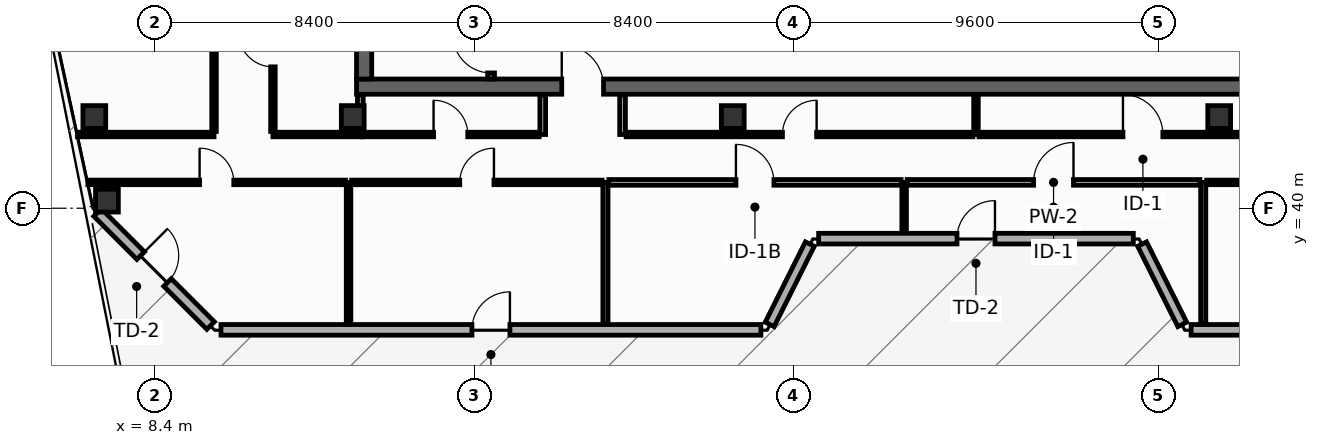
"""IFC4 building model, lengths in metres.
Left out: names, types, materials, properties, quantities, classifications, styles, units other than length and angle.
Written with IfcOpenShell. Run it as: python <this file> out.ifc"""

import sys

from ifc_helpers import new_model, si_unit, direction, frame, frame_2d, origin, origin_2d, place, context, subcontext, project, spatial, rectangle, hollow_rectangle, extrude, element, fill, save


model = new_model("IFC4")
c1 = context("Model", 3, precision=1e-05, world=origin(), true_north=direction((0.0, 1.0)))
c2 = subcontext(c1, "Body", "Model", "MODEL_VIEW")
j1 = project(units=[si_unit("LENGTHUNIT", "METRE"), si_unit("PLANEANGLEUNIT", "RADIAN")], contexts=[c1])
p1 = place(None, origin())
s1 = spatial("IfcSite", under=j1, at=p1, CompositionType="ELEMENT")
p2 = place(p1, origin())
s2 = spatial("IfcBuilding", under=s1, at=p2, CompositionType="ELEMENT")
p3 = place(p2, frame((0.0, 0.0, 310.4)))
s3 = spatial("IfcBuildingStorey", under=s2, at=p3, CompositionType="ELEMENT", Elevation=310.4)
p4 = place(p3, frame((13.7, 43.2, 0.0), z_axis=(0.0, 0.0, 1.0), x_axis=(1.0, 0.0, 0.0)))
e1 = element("IfcWall", 1, at=p4, inside=s3, PredefinedType="SHEAR", context=c2, shape_type="SweptSolid", body=[
    extrude(rectangle(XDim=32.5, YDim=0.4, at=frame_2d((16.25, 0.0))), origin(), (0.0, 0.0, 1.0), 3.55),
])
p5 = place(p4, frame((5.4, 0.0, 0.0)))
e2 = element("IfcOpeningElement", 2, at=p5, cuts=e1, PredefinedType="OPENING", context=c2, shape_type="SweptSolid", body=[
    extrude(rectangle(XDim=1.1, YDim=2.15, at=frame_2d((0.55, 1.075))), frame((0.0, 0.21, 0.0), z_axis=(0.0, -1.0, 0.0), x_axis=(1.0, 0.0, 0.0)), (0.0, 0.0, 1.0), 0.42),
])
p6 = place(p4, frame((25.6, 0.0, 0.0)))
e3 = element("IfcOpeningElement", 3, at=p6, cuts=e1, PredefinedType="OPENING", context=c2, shape_type="SweptSolid", body=[
    extrude(rectangle(XDim=1.1, YDim=2.15, at=frame_2d((0.55, 1.075))), frame((0.0, 0.21, 0.0), z_axis=(0.0, -1.0, 0.0), x_axis=(1.0, 0.0, 0.0)), (0.0, 0.0, 1.0), 0.42),
])
p7 = place(p3, frame((13.9, 43.4, 0.0), z_axis=(0.0, 0.0, 1.0), x_axis=(0.0, 1.0, 0.0)))
e4 = element("IfcWall", 4, at=p7, inside=s3, PredefinedType="SHEAR", context=c2, shape_type="SweptSolid", body=[
    extrude(rectangle(XDim=10.4, YDim=0.4, at=frame_2d((5.2, 0.0))), origin(), (0.0, 0.0, 1.0), 3.55),
])
for number, where, z_axis, x_axis in (
    (5, (6.8, 42.4, 0.0), (0.0, 0.0, 1.0), (1.0, 0.0, 0.0)),
    (6, (13.6, 42.4, 0.0), (0.0, 0.0, 1.0), (1.0, 0.0, 0.0)),
    (7, (23.6, 42.4, 0.0), (0.0, 0.0, 1.0), (1.0, 0.0, 0.0)),
    (8, (36.4, 42.4, 0.0), (0.0, 0.0, 1.0), (1.0, 0.0, 0.0)),
    (9, (7.132, 40.2, 0.0), (0.0, 0.0, 1.0), (1.0, 0.0, 0.0)),
):
    element("IfcColumn", number, at=place(p3, frame(where, z_axis=z_axis, x_axis=x_axis)), inside=s3, PredefinedType="COLUMN", context=c2, shape_type="SweptSolid", body=[
        extrude(hollow_rectangle(XDim=0.6, YDim=0.6, WallThickness=0.028, at=origin_2d()), origin(), (0.0, 0.0, 1.0), 3.8),
    ])
p8 = place(p3, frame((17.24, 43.4, 0.0), z_axis=(0.0, 0.0, 1.0), x_axis=(0.0, 1.0, 0.0)))
e10 = element("IfcWall", 10, at=p8, inside=s3, PredefinedType="SHEAR", context=c2, shape_type="SweptSolid", body=[
    extrude(rectangle(XDim=10.4, YDim=0.18, at=frame_2d((5.2, 0.0))), origin(), (0.0, 0.0, 1.0), 3.55),
])
p9 = place(p8, frame((0.16, 0.0, 0.0)))
e11 = element("IfcOpeningElement", 11, at=p9, cuts=e10, PredefinedType="OPENING", context=c2, shape_type="SweptSolid", body=[
    extrude(rectangle(XDim=1.0, YDim=2.15, at=frame_2d((0.5, 1.075))), frame((0.0, 0.1, 0.0), z_axis=(0.0, -1.0, 0.0), x_axis=(1.0, 0.0, 0.0)), (0.0, 0.0, 1.0), 0.2),
])
p10 = place(p3, frame((6.886, 39.887, 0.0), z_axis=(0.0, 0.0, 1.0), x_axis=(0.70707775441, -0.707135806771, 0.0)))
e12 = element("IfcWall", 12, at=p10, inside=s3, PredefinedType="STANDARD", context=c2, shape_type="SweptSolid", body=[
    extrude(rectangle(XDim=4.206, YDim=0.28, at=frame_2d((2.103, 0.0))), origin(), (0.0, 0.0, 1.0), 3.55),
])
p11 = place(p10, frame((1.603, 0.0, 0.0)))
e13 = element("IfcOpeningElement", 13, at=p11, cuts=e12, PredefinedType="OPENING", context=c2, shape_type="SweptSolid", body=[
    extrude(rectangle(XDim=1.0, YDim=2.2, at=frame_2d((0.5, 1.1))), frame((0.0, 0.15, 0.0), z_axis=(0.0, -1.0, 0.0), x_axis=(1.0, 0.0, 0.0)), (0.0, 0.0, 1.0), 0.3),
])
p12 = place(p3, frame((10.133, 36.8, 0.0), z_axis=(0.0, 0.0, 1.0), x_axis=(1.0, 0.0, 0.0)))
e14 = element("IfcWall", 14, at=p12, inside=s3, PredefinedType="STANDARD", context=c2, shape_type="SweptSolid", body=[
    extrude(rectangle(XDim=14.207, YDim=0.28, at=frame_2d((7.104, 0.0))), origin(), (0.0, 0.0, 1.0), 3.55),
])
p13 = place(p12, frame((6.603, 0.0, 0.0)))
e15 = element("IfcOpeningElement", 15, at=p13, cuts=e14, PredefinedType="OPENING", context=c2, shape_type="SweptSolid", body=[
    extrude(rectangle(XDim=1.0, YDim=2.2, at=frame_2d((0.5, 1.1))), frame((0.0, 0.15, 0.0), z_axis=(0.0, -1.0, 0.0), x_axis=(1.0, 0.0, 0.0)), (0.0, 0.0, 1.0), 0.3),
])
p14 = place(p3, frame((24.572, 36.943, 0.0), z_axis=(0.0, 0.0, 1.0), x_axis=(0.4472135955, 0.894427191, 0.0)))
e16 = element("IfcWall", 16, at=p14, inside=s3, PredefinedType="STANDARD", context=c2, shape_type="SweptSolid", body=[
    extrude(rectangle(XDim=2.363, YDim=0.26, at=frame_2d((1.182, 0.0))), origin(), (0.0, 0.0, 1.0), 3.55),
])
p15 = place(p3, frame((25.86, 39.2, 0.0), z_axis=(0.0, 0.0, 1.0), x_axis=(1.0, 0.0, 0.0)))
e17 = element("IfcWall", 17, at=p15, inside=s3, PredefinedType="STANDARD", context=c2, shape_type="SweptSolid", body=[
    extrude(rectangle(XDim=8.28, YDim=0.28, at=frame_2d((4.14, 0.0))), origin(), (0.0, 0.0, 1.0), 3.55),
])
p16 = place(p15, frame((3.64, 0.0, 0.0)))
e18 = element("IfcOpeningElement", 18, at=p16, cuts=e17, PredefinedType="OPENING", context=c2, shape_type="SweptSolid", body=[
    extrude(rectangle(XDim=1.0, YDim=2.2, at=frame_2d((0.5, 1.1))), frame((0.0, 0.15, 0.0), z_axis=(0.0, -1.0, 0.0), x_axis=(1.0, 0.0, 0.0)), (0.0, 0.0, 1.0), 0.3),
])
p17 = place(p3, frame((34.372, 39.057, 0.0), z_axis=(0.0, 0.0, 1.0), x_axis=(0.4472135955, -0.894427191, 0.0)))
e19 = element("IfcWall", 19, at=p17, inside=s3, PredefinedType="STANDARD", context=c2, shape_type="SweptSolid", body=[
    extrude(rectangle(XDim=2.363, YDim=0.26, at=frame_2d((1.182, 0.0))), origin(), (0.0, 0.0, 1.0), 3.55),
])
p18 = place(p3, frame((35.66, 36.8, 0.0), z_axis=(0.0, 0.0, 1.0), x_axis=(1.0, 0.0, 0.0)))
e20 = element("IfcWall", 20, at=p18, inside=s3, PredefinedType="STANDARD", context=c2, shape_type="SweptSolid", body=[
    extrude(rectangle(XDim=14.207, YDim=0.28, at=frame_2d((7.104, 0.0))), origin(), (0.0, 0.0, 1.0), 3.55),
])
p19 = place(p18, frame((6.603, 0.0, 0.0)))
e21 = element("IfcOpeningElement", 21, at=p19, cuts=e20, PredefinedType="OPENING", context=c2, shape_type="SweptSolid", body=[
    extrude(rectangle(XDim=1.0, YDim=2.2, at=frame_2d((0.5, 1.1))), frame((0.0, 0.15, 0.0), z_axis=(0.0, -1.0, 0.0), x_axis=(1.0, 0.0, 0.0)), (0.0, 0.0, 1.0), 0.3),
])
p20 = place(p3, frame((6.358, 41.94, 0.0), z_axis=(0.0, 0.0, 1.0), x_axis=(1.0, 0.0, 0.0)))
e22 = element("IfcWall", 22, at=p20, inside=s3, PredefinedType="PARTITIONING", context=c2, shape_type="SweptSolid", body=[
    extrude(rectangle(XDim=3.592, YDim=0.12, at=frame_2d((1.796, 0.0))), origin(), (0.0, 0.0, 1.0), 3.085),
])
p21 = place(p3, frame((11.5, 41.94, 0.0), z_axis=(0.0, 0.0, 1.0), x_axis=(1.0, 0.0, 0.0)))
e23 = element("IfcWall", 23, at=p21, inside=s3, PredefinedType="PARTITIONING", context=c2, shape_type="SweptSolid", body=[
    extrude(rectangle(XDim=2.35, YDim=0.12, at=frame_2d((1.175, 0.0))), origin(), (0.0, 0.0, 1.0), 3.55),
])
p22 = place(p3, frame((9.95, 42.02, 0.0), z_axis=(0.0, 0.0, 1.0), x_axis=(0.0, 1.0, 0.0)))
e24 = element("IfcWall", 24, at=p22, inside=s3, PredefinedType="PARTITIONING", context=c2, shape_type="SweptSolid", body=[
    extrude(rectangle(XDim=6.3, YDim=0.12, at=frame_2d((3.15, 0.0))), origin(), (0.0, 0.0, 1.0), 2.947),
])
p23 = place(p22, frame((2.7, 0.0, 0.0)))
e25 = element("IfcOpeningElement", 25, at=p23, cuts=e24, PredefinedType="OPENING", context=c2, shape_type="SweptSolid", body=[
    extrude(rectangle(XDim=0.9, YDim=2.1, at=frame_2d((0.45, 1.05))), frame((0.0, 0.07, 0.0), z_axis=(0.0, -1.0, 0.0), x_axis=(1.0, 0.0, 0.0)), (0.0, 0.0, 1.0), 0.14),
])
p24 = place(p3, frame((11.5, 42.02, 0.0), z_axis=(0.0, 0.0, 1.0), x_axis=(0.0, 1.0, 0.0)))
e26 = element("IfcWall", 26, at=p24, inside=s3, PredefinedType="PARTITIONING", context=c2, shape_type="SweptSolid", body=[
    extrude(rectangle(XDim=4.3, YDim=0.12, at=frame_2d((2.15, 0.0))), origin(), (0.0, 0.0, 1.0), 2.947),
])
p25 = place(p24, frame((1.7, 0.0, 0.0)))
e27 = element("IfcOpeningElement", 27, at=p25, cuts=e26, PredefinedType="OPENING", context=c2, shape_type="SweptSolid", body=[
    extrude(rectangle(XDim=0.9, YDim=2.1, at=frame_2d((0.45, 1.05))), frame((0.0, 0.07, 0.0), z_axis=(0.0, -1.0, 0.0), x_axis=(1.0, 0.0, 0.0)), (0.0, 0.0, 1.0), 0.14),
])
p26 = place(p3, frame((13.8, 42.02, 0.0), z_axis=(0.0, 0.0, 1.0), x_axis=(0.0, 1.0, 0.0)))
e28 = element("IfcWall", 28, at=p26, inside=s3, PredefinedType="PARTITIONING", context=c2, shape_type="SweptSolid", body=[
    extrude(rectangle(XDim=0.96, YDim=0.15, at=frame_2d((0.48, 0.0))), origin(), (0.0, 0.0, 1.0), 3.55),
])
for number, where, z_axis, x_axis in (
    (29, (18.6, 41.94, 0.0), (0.0, 0.0, 1.0), (0.0, 1.0, 0.0)),
    (30, (20.7, 41.94, 0.0), (0.0, 0.0, 1.0), (0.0, 1.0, 0.0)),
):
    element("IfcWall", number, at=place(p3, frame(where, z_axis=z_axis, x_axis=x_axis)), inside=s3, PredefinedType="PARTITIONING", context=c2, shape_type="SweptSolid", body=[
        extrude(rectangle(XDim=1.04, YDim=0.15, at=frame_2d((0.52, 0.0))), origin(), (0.0, 0.0, 1.0), 3.55),
    ])
p27 = place(p3, frame((13.85, 41.94, 0.0), z_axis=(0.0, 0.0, 1.0), x_axis=(1.0, 0.0, 0.0)))
e31 = element("IfcWall", 31, at=p27, inside=s3, PredefinedType="PARTITIONING", context=c2, shape_type="SweptSolid", body=[
    extrude(rectangle(XDim=4.655, YDim=0.12, at=frame_2d((2.327, 0.0))), origin(), (0.0, 0.0, 1.0), 3.55),
])
p28 = place(p27, frame((1.877, 0.0, 0.0)))
e32 = element("IfcOpeningElement", 32, at=p28, cuts=e31, PredefinedType="OPENING", context=c2, shape_type="SweptSolid", body=[
    extrude(rectangle(XDim=0.9, YDim=2.1, at=frame_2d((0.45, 1.05))), frame((0.0, 0.07, 0.0), z_axis=(0.0, -1.0, 0.0), x_axis=(1.0, 0.0, 0.0)), (0.0, 0.0, 1.0), 0.14),
])
p29 = place(p3, frame((30.0, 41.94, 0.0), z_axis=(0.0, 0.0, 1.0), x_axis=(0.0, 1.0, 0.0)))
e33 = element("IfcWall", 33, at=p29, inside=s3, PredefinedType="PARTITIONING", context=c2, shape_type="SweptSolid", body=[
    extrude(rectangle(XDim=1.04, YDim=0.12, at=frame_2d((0.52, 0.0))), origin(), (0.0, 0.0, 1.0), 2.947),
])
p30 = place(p3, frame((20.795, 41.94, 0.0), z_axis=(0.0, 0.0, 1.0), x_axis=(1.0, 0.0, 0.0)))
e34 = element("IfcWall", 34, at=p30, inside=s3, PredefinedType="PARTITIONING", context=c2, shape_type="SweptSolid", body=[
    extrude(rectangle(XDim=9.125, YDim=0.12, at=frame_2d((4.562, 0.0))), origin(), (0.0, 0.0, 1.0), 3.55),
])
p31 = place(p30, frame((4.112, 0.0, 0.0)))
e35 = element("IfcOpeningElement", 35, at=p31, cuts=e34, PredefinedType="OPENING", context=c2, shape_type="SweptSolid", body=[
    extrude(rectangle(XDim=0.9, YDim=2.1, at=frame_2d((0.45, 1.05))), frame((0.0, 0.07, 0.0), z_axis=(0.0, -1.0, 0.0), x_axis=(1.0, 0.0, 0.0)), (0.0, 0.0, 1.0), 0.14),
])
p32 = place(p3, frame((30.08, 41.94, 0.0), z_axis=(0.0, 0.0, 1.0), x_axis=(1.0, 0.0, 0.0)))
e36 = element("IfcWall", 36, at=p32, inside=s3, PredefinedType="PARTITIONING", context=c2, shape_type="SweptSolid", body=[
    extrude(rectangle(XDim=8.625, YDim=0.12, at=frame_2d((4.312, 0.0))), origin(), (0.0, 0.0, 1.0), 3.55),
])
p33 = place(p32, frame((3.788, 0.0, 0.0)))
e37 = element("IfcOpeningElement", 37, at=p33, cuts=e36, PredefinedType="OPENING", context=c2, shape_type="SweptSolid", body=[
    extrude(rectangle(XDim=1.05, YDim=2.15, at=frame_2d((0.525, 1.075))), frame((0.0, 0.07, 0.0), z_axis=(0.0, -1.0, 0.0), x_axis=(1.0, 0.0, 0.0)), (0.0, 0.0, 1.0), 0.14),
])
p34 = place(p3, frame((13.49, 36.96, 0.0), z_axis=(0.0, 0.0, 1.0), x_axis=(0.0, 1.0, 0.0)))
e38 = element("IfcWall", 38, at=p34, inside=s3, PredefinedType="PARTITIONING", context=c2, shape_type="SweptSolid", body=[
    extrude(rectangle(XDim=3.72, YDim=0.12, at=frame_2d((1.86, 0.0))), origin(), (0.0, 0.0, 1.0), 3.55),
])
p35 = place(p3, frame((20.25, 36.96, 0.0), z_axis=(0.0, 0.0, 1.0), x_axis=(0.0, 1.0, 0.0)))
e39 = element("IfcWall", 39, at=p35, inside=s3, PredefinedType="PARTITIONING", context=c2, shape_type="SweptSolid", body=[
    extrude(rectangle(XDim=3.72, YDim=0.135, at=frame_2d((1.86, 0.0))), origin(), (0.0, 0.0, 1.0), 3.55),
])
p36 = place(p3, frame((28.11, 39.36, 0.0), z_axis=(0.0, 0.0, 1.0), x_axis=(0.0, 1.0, 0.0)))
e40 = element("IfcWall", 40, at=p36, inside=s3, PredefinedType="PARTITIONING", context=c2, shape_type="SweptSolid", body=[
    extrude(rectangle(XDim=1.32, YDim=0.12, at=frame_2d((0.66, 0.0))), origin(), (0.0, 0.0, 1.0), 3.55),
])
p37 = place(p3, frame((35.98, 36.96, 0.0), z_axis=(0.0, 0.0, 1.0), x_axis=(0.0, 1.0, 0.0)))
e41 = element("IfcWall", 41, at=p37, inside=s3, PredefinedType="PARTITIONING", context=c2, shape_type="SweptSolid", body=[
    extrude(rectangle(XDim=3.72, YDim=0.135, at=frame_2d((1.86, 0.0))), origin(), (0.0, 0.0, 1.0), 3.55),
])
p38 = place(p3, frame((6.631, 40.68, 0.0), z_axis=(0.0, 0.0, 1.0), x_axis=(1.0, 0.0, 0.0)))
e42 = element("IfcWall", 42, at=p38, inside=s3, PredefinedType="PARTITIONING", context=c2, shape_type="SweptSolid", body=[
    extrude(rectangle(XDim=6.779, YDim=0.12, at=frame_2d((3.389, 0.0))), origin(), (0.0, 0.0, 1.0), 3.085),
])
p39 = place(p38, frame((2.939, 0.0, 0.0)))
e43 = element("IfcOpeningElement", 43, at=p39, cuts=e42, PredefinedType="OPENING", context=c2, shape_type="SweptSolid", body=[
    extrude(rectangle(XDim=0.9, YDim=2.1, at=frame_2d((0.45, 1.05))), frame((0.0, 0.07, 0.0), z_axis=(0.0, -1.0, 0.0), x_axis=(1.0, 0.0, 0.0)), (0.0, 0.0, 1.0), 0.14),
])
p40 = place(p3, frame((13.57, 40.68, 0.0), z_axis=(0.0, 0.0, 1.0), x_axis=(1.0, 0.0, 0.0)))
e44 = element("IfcWall", 44, at=p40, inside=s3, PredefinedType="PARTITIONING", context=c2, shape_type="SweptSolid", body=[
    extrude(rectangle(XDim=6.593, YDim=0.12, at=frame_2d((3.296, 0.0))), origin(), (0.0, 0.0, 1.0), 3.55),
])
p41 = place(p40, frame((2.846, 0.0, 0.0)))
e45 = element("IfcOpeningElement", 45, at=p41, cuts=e44, PredefinedType="OPENING", context=c2, shape_type="SweptSolid", body=[
    extrude(rectangle(XDim=0.9, YDim=2.1, at=frame_2d((0.45, 1.05))), frame((0.0, 0.07, 0.0), z_axis=(0.0, -1.0, 0.0), x_axis=(1.0, 0.0, 0.0)), (0.0, 0.0, 1.0), 0.14),
])
p42 = place(p3, frame((20.337, 40.68, 0.0), z_axis=(0.0, 0.0, 1.0), x_axis=(1.0, 0.0, 0.0)))
e46 = element("IfcWall", 46, at=p42, inside=s3, PredefinedType="PARTITIONING", context=c2, shape_type="SweptSolid", body=[
    extrude(rectangle(XDim=7.693, YDim=0.15, at=frame_2d((3.846, 0.0))), origin(), (0.0, 0.0, 1.0), 3.55),
])
p43 = place(p42, frame((3.346, 0.0, 0.0)))
e47 = element("IfcOpeningElement", 47, at=p43, cuts=e46, PredefinedType="OPENING", context=c2, shape_type="SweptSolid", body=[
    extrude(rectangle(XDim=1.0, YDim=2.15, at=frame_2d((0.5, 1.075))), frame((0.0, 0.085, 0.0), z_axis=(0.0, -1.0, 0.0), x_axis=(1.0, 0.0, 0.0)), (0.0, 0.0, 1.0), 0.17),
])
p44 = place(p3, frame((28.19, 40.68, 0.0), z_axis=(0.0, 0.0, 1.0), x_axis=(1.0, 0.0, 0.0)))
e48 = element("IfcWall", 48, at=p44, inside=s3, PredefinedType="PARTITIONING", context=c2, shape_type="SweptSolid", body=[
    extrude(rectangle(XDim=7.703, YDim=0.15, at=frame_2d((3.851, 0.0))), origin(), (0.0, 0.0, 1.0), 3.55),
])
p45 = place(p44, frame((3.326, 0.0, 0.0)))
e49 = element("IfcOpeningElement", 49, at=p45, cuts=e48, PredefinedType="OPENING", context=c2, shape_type="SweptSolid", body=[
    extrude(rectangle(XDim=1.05, YDim=2.15, at=frame_2d((0.525, 1.075))), frame((0.0, 0.085, 0.0), z_axis=(0.0, -1.0, 0.0), x_axis=(1.0, 0.0, 0.0)), (0.0, 0.0, 1.0), 0.17),
])
p46 = place(p3, frame((36.067, 40.68, 0.0), z_axis=(0.0, 0.0, 1.0), x_axis=(1.0, 0.0, 0.0)))
e50 = element("IfcWall", 50, at=p46, inside=s3, PredefinedType="PARTITIONING", context=c2, shape_type="SweptSolid", body=[
    extrude(rectangle(XDim=9.143, YDim=0.12, at=frame_2d((4.571, 0.0))), origin(), (0.0, 0.0, 1.0), 3.55),
])
p47 = place(p46, frame((4.046, 0.0, 0.0)))
e51 = element("IfcOpeningElement", 51, at=p47, cuts=e50, PredefinedType="OPENING", context=c2, shape_type="SweptSolid", body=[
    extrude(rectangle(XDim=1.05, YDim=2.15, at=frame_2d((0.525, 1.075))), frame((0.0, 0.07, 0.0), z_axis=(0.0, -1.0, 0.0), x_axis=(1.0, 0.0, 0.0)), (0.0, 0.0, 1.0), 0.14),
])
p48 = place(p9, origin())
e52 = element("IfcDoor", 52, at=p48, inside=s3, OperationType="SINGLE_SWING_RIGHT", PredefinedType="DOOR", context=c2, shape_type="SweptSolid", body=[
    extrude(rectangle(XDim=1.0, YDim=2.15, at=frame_2d((0.5, 1.075))), frame((0.0, 0.025, 0.0), z_axis=(0.0, -1.0, 0.0), x_axis=(1.0, 0.0, 0.0)), (0.0, 0.0, 1.0), 0.05),
])
fill(e11, e52)
p49 = place(p5, origin())
e53 = element("IfcDoor", 53, at=p49, inside=s3, OperationType="SINGLE_SWING_LEFT", PredefinedType="DOOR", context=c2, shape_type="SweptSolid", body=[
    extrude(rectangle(XDim=1.1, YDim=2.15, at=frame_2d((0.55, 1.075))), frame((0.0, 0.025, 0.0), z_axis=(0.0, -1.0, 0.0), x_axis=(1.0, 0.0, 0.0)), (0.0, 0.0, 1.0), 0.05),
])
fill(e2, e53)
p50 = place(p11, origin())
e54 = element("IfcDoor", 54, at=p50, inside=s3, OperationType="SINGLE_SWING_LEFT", PredefinedType="DOOR", context=c2, shape_type="SweptSolid", body=[
    extrude(rectangle(XDim=1.0, YDim=2.2, at=frame_2d((0.5, 1.1))), frame((0.0, 0.025, 0.0), z_axis=(0.0, -1.0, 0.0), x_axis=(1.0, 0.0, 0.0)), (0.0, 0.0, 1.0), 0.05),
])
fill(e13, e54)
p51 = place(p13, origin())
e55 = element("IfcDoor", 55, at=p51, inside=s3, OperationType="SINGLE_SWING_RIGHT", PredefinedType="DOOR", context=c2, shape_type="SweptSolid", body=[
    extrude(rectangle(XDim=1.0, YDim=2.2, at=frame_2d((0.5, 1.1))), frame((0.0, 0.025, 0.0), z_axis=(0.0, -1.0, 0.0), x_axis=(1.0, 0.0, 0.0)), (0.0, 0.0, 1.0), 0.05),
])
fill(e15, e55)
p52 = place(p16, origin())
e56 = element("IfcDoor", 56, at=p52, inside=s3, OperationType="SINGLE_SWING_RIGHT", PredefinedType="DOOR", context=c2, shape_type="SweptSolid", body=[
    extrude(rectangle(XDim=1.0, YDim=2.2, at=frame_2d((0.5, 1.1))), frame((0.0, 0.025, 0.0), z_axis=(0.0, -1.0, 0.0), x_axis=(1.0, 0.0, 0.0)), (0.0, 0.0, 1.0), 0.05),
])
fill(e18, e56)
p53 = place(p25, origin())
e57 = element("IfcDoor", 57, at=p53, inside=s3, OperationType="SINGLE_SWING_RIGHT", PredefinedType="DOOR", context=c2, shape_type="SweptSolid", body=[
    extrude(rectangle(XDim=0.9, YDim=2.1, at=frame_2d((0.45, 1.05))), frame((0.0, 0.025, 0.0), z_axis=(0.0, -1.0, 0.0), x_axis=(1.0, 0.0, 0.0)), (0.0, 0.0, 1.0), 0.05),
])
fill(e27, e57)
p54 = place(p28, origin())
e58 = element("IfcDoor", 58, at=p54, inside=s3, OperationType="SINGLE_SWING_LEFT", PredefinedType="DOOR", context=c2, shape_type="SweptSolid", body=[
    extrude(rectangle(XDim=0.9, YDim=2.1, at=frame_2d((0.45, 1.05))), frame((0.0, 0.025, 0.0), z_axis=(0.0, -1.0, 0.0), x_axis=(1.0, 0.0, 0.0)), (0.0, 0.0, 1.0), 0.05),
])
fill(e32, e58)
p55 = place(p31, origin())
e59 = element("IfcDoor", 59, at=p55, inside=s3, OperationType="SINGLE_SWING_RIGHT", PredefinedType="DOOR", context=c2, shape_type="SweptSolid", body=[
    extrude(rectangle(XDim=0.9, YDim=2.1, at=frame_2d((0.45, 1.05))), frame((0.0, 0.025, 0.0), z_axis=(0.0, -1.0, 0.0), x_axis=(1.0, 0.0, 0.0)), (0.0, 0.0, 1.0), 0.05),
])
fill(e35, e59)
p56 = place(p33, origin())
e60 = element("IfcDoor", 60, at=p56, inside=s3, OperationType="SINGLE_SWING_LEFT", PredefinedType="DOOR", context=c2, shape_type="SweptSolid", body=[
    extrude(rectangle(XDim=1.05, YDim=2.15, at=frame_2d((0.525, 1.075))), frame((0.0, 0.025, 0.0), z_axis=(0.0, -1.0, 0.0), x_axis=(1.0, 0.0, 0.0)), (0.0, 0.0, 1.0), 0.05),
])
fill(e37, e60)
p57 = place(p39, origin())
e61 = element("IfcDoor", 61, at=p57, inside=s3, OperationType="SINGLE_SWING_LEFT", PredefinedType="DOOR", context=c2, shape_type="SweptSolid", body=[
    extrude(rectangle(XDim=0.9, YDim=2.1, at=frame_2d((0.45, 1.05))), frame((0.0, 0.025, 0.0), z_axis=(0.0, -1.0, 0.0), x_axis=(1.0, 0.0, 0.0)), (0.0, 0.0, 1.0), 0.05),
])
fill(e43, e61)
p58 = place(p41, origin())
e62 = element("IfcDoor", 62, at=p58, inside=s3, OperationType="SINGLE_SWING_RIGHT", PredefinedType="DOOR", context=c2, shape_type="SweptSolid", body=[
    extrude(rectangle(XDim=0.9, YDim=2.1, at=frame_2d((0.45, 1.05))), frame((0.0, 0.025, 0.0), z_axis=(0.0, -1.0, 0.0), x_axis=(1.0, 0.0, 0.0)), (0.0, 0.0, 1.0), 0.05),
])
fill(e45, e62)
p59 = place(p43, origin())
e63 = element("IfcDoor", 63, at=p59, inside=s3, OperationType="SINGLE_SWING_LEFT", PredefinedType="DOOR", context=c2, shape_type="SweptSolid", body=[
    extrude(rectangle(XDim=1.0, YDim=2.15, at=frame_2d((0.5, 1.075))), frame((0.0, 0.025, 0.0), z_axis=(0.0, -1.0, 0.0), x_axis=(1.0, 0.0, 0.0)), (0.0, 0.0, 1.0), 0.05),
])
fill(e47, e63)
p60 = place(p45, origin())
e64 = element("IfcDoor", 64, at=p60, inside=s3, OperationType="SINGLE_SWING_RIGHT", PredefinedType="DOOR", context=c2, shape_type="SweptSolid", body=[
    extrude(rectangle(XDim=1.05, YDim=2.15, at=frame_2d((0.525, 1.075))), frame((0.0, 0.025, 0.0), z_axis=(0.0, -1.0, 0.0), x_axis=(1.0, 0.0, 0.0)), (0.0, 0.0, 1.0), 0.05),
])
fill(e49, e64)
save(model, sys.argv[1])
